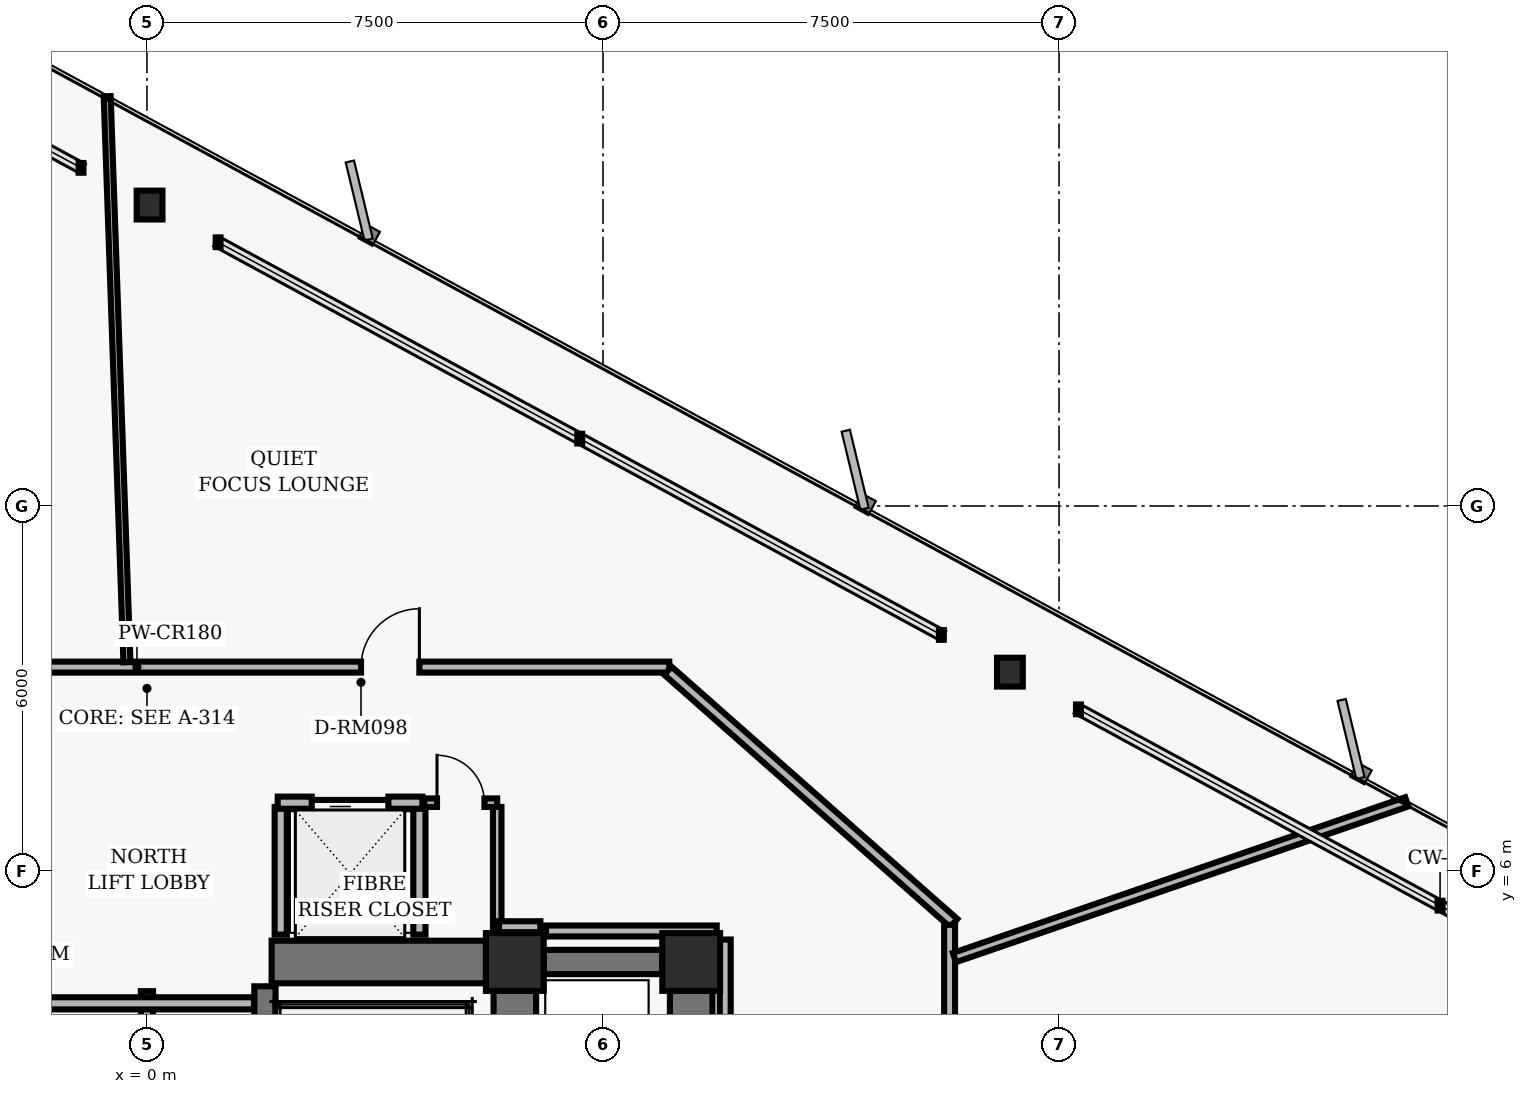
"""IFC4 building model, lengths in metres.
Left out: names, types, materials, properties, quantities, classifications, styles, units other than length and angle.
Written with IfcOpenShell. Run it as: python <this file> out.ifc"""

import sys

from ifc_helpers import new_model, si_unit, direction, frame, frame_2d, origin, origin_2d, place, context, subcontext, project, spatial, rectangle, hollow_rectangle, i_section, extrude, element, fill, save


model = new_model("IFC4")
c1 = context("Model", 3, precision=1e-05, world=origin(), true_north=direction((0.0, 1.0)))
c2 = subcontext(c1, "Body", "Model", "MODEL_VIEW")
j1 = project(units=[si_unit("LENGTHUNIT", "METRE"), si_unit("PLANEANGLEUNIT", "RADIAN")], contexts=[c1])
p1 = place(None, origin())
s1 = spatial("IfcSite", under=j1, at=p1, CompositionType="ELEMENT")
p2 = place(p1, origin())
s2 = spatial("IfcBuilding", under=s1, at=p2, CompositionType="ELEMENT")
p3 = place(p2, frame((0.0, 0.0, 39.04)))
s3 = spatial("IfcBuildingStorey", under=s2, at=p3, CompositionType="ELEMENT", Elevation=39.04)
for number, where, z_axis, x_axis in (
    (1, (6.05, 4.5, 0.0), (0.0, 0.0, 1.0), (1.0, 0.0, 0.0)),
    (2, (8.95, 4.5, 0.0), (0.0, 0.0, 1.0), (1.0, 0.0, 0.0)),
):
    element("IfcColumn", number, at=place(p3, frame(where, z_axis=z_axis, x_axis=x_axis)), inside=s3, PredefinedType="COLUMN", context=c2, shape_type="SweptSolid", body=[
        extrude(hollow_rectangle(XDim=0.95, YDim=0.95, WallThickness=0.06, InnerFilletRadius=0.02, OuterFilletRadius=0.04, at=origin_2d()), origin(), (0.0, 0.0, 1.0), 3.36),
    ])
p4 = place(p3, frame((6.05, 0.475, 0.0), z_axis=(0.0, 0.0, 1.0), x_axis=(0.0, 1.0, 0.0)))
e3 = element("IfcWall", 3, at=p4, inside=s3, PredefinedType="SHEAR", context=c2, shape_type="SweptSolid", body=[
    extrude(rectangle(XDim=3.55, YDim=0.7, at=frame_2d((1.775, 0.0))), origin(), (0.0, 0.0, 1.0), 3.098),
])
p5 = place(p3, frame((1.94, -4.1, 0.0), z_axis=(0.0, 0.0, 1.0), x_axis=(0.0, 1.0, 0.0)))
e4 = element("IfcWall", 4, at=p5, inside=s3, PredefinedType="SHEAR", context=c2, shape_type="SweptSolid", body=[
    extrude(rectangle(XDim=8.2, YDim=0.35, at=frame_2d((4.1, 0.0))), origin(), (0.0, 0.0, 1.0), 3.098),
])
p6 = place(p3, frame((2.05, 4.5, 0.0), z_axis=(0.0, 0.0, 1.0), x_axis=(1.0, 0.0, 0.0)))
e5 = element("IfcWall", 5, at=p6, inside=s3, PredefinedType="SHEAR", context=c2, shape_type="SweptSolid", body=[
    extrude(rectangle(XDim=3.525, YDim=0.7, at=frame_2d((1.762, 0.0))), origin(), (0.0, 0.0, 1.0), 3.098),
])
p7 = place(p3, frame((8.95, -3.825, 0.0), z_axis=(0.0, 0.0, 1.0), x_axis=(0.0, 1.0, 0.0)))
e6 = element("IfcWall", 6, at=p7, inside=s3, PredefinedType="SHEAR", context=c2, shape_type="SweptSolid", body=[
    extrude(rectangle(XDim=7.85, YDim=0.7, at=frame_2d((3.925, 0.0))), origin(), (0.0, 0.0, 1.0), 3.098),
])
p8 = place(p3, frame((6.525, 4.5, 0.0), z_axis=(0.0, 0.0, 1.0), x_axis=(1.0, 0.0, 0.0)))
e7 = element("IfcWall", 7, at=p8, inside=s3, PredefinedType="SHEAR", context=c2, shape_type="SweptSolid", body=[
    extrude(rectangle(XDim=1.95, YDim=0.4, at=frame_2d((0.975, 0.0))), origin(), (0.0, 0.0, 1.0), 3.098),
])
for number, where, z_axis, x_axis in (
    (8, (14.192, 9.267, 0.0), (0.0, 0.0, 1.0), (1.0, 0.0, 0.0)),
    (9, (0.043, 16.949, 0.0), (0.0, 0.0, 1.0), (1.0, 0.0, 0.0)),
):
    element("IfcColumn", number, at=place(p3, frame(where, z_axis=z_axis, x_axis=x_axis)), inside=s3, PredefinedType="COLUMN", context=c2, shape_type="SweptSolid", body=[
        extrude(i_section(OverallWidth=0.424, OverallDepth=0.474, WebThickness=0.048, FlangeThickness=0.077, FilletRadius=0.025, at=origin_2d()), origin(), (0.0, 0.0, 1.0), 3.36),
    ])
p9 = place(p3, frame((0.0, 1.25, 0.0), z_axis=(0.0, 0.0, 1.0), x_axis=(0.0, 1.0, 0.0)))
e10 = element("IfcWall", 10, at=p9, inside=s3, PredefinedType="PARTITIONING", context=c2, shape_type="SweptSolid", body=[
    extrude(rectangle(XDim=2.77, YDim=0.2, at=frame_2d((1.385, 0.0))), origin(), (0.0, 0.0, 1.0), 3.073),
])
p10 = place(p3, frame((-1.76, 3.82, 0.0), z_axis=(0.0, 0.0, 1.0), x_axis=(1.0, 0.0, 0.0)))
e11 = element("IfcWall", 11, at=p10, inside=s3, PredefinedType="PARTITIONING", context=c2, shape_type="SweptSolid", body=[
    extrude(rectangle(XDim=3.52, YDim=0.2, at=frame_2d((1.76, 0.0))), origin(), (0.0, 0.0, 1.0), 3.073),
])
for number, where, z_axis, x_axis in (
    (12, (2.2, 4.95, 0.0), (0.0, 0.0, 1.0), (0.0, 1.0, 0.0)),
    (13, (4.48, 4.95, 0.0), (0.0, 0.0, 1.0), (0.0, 1.0, 0.0)),
):
    element("IfcWall", number, at=place(p3, frame(where, z_axis=z_axis, x_axis=x_axis)), inside=s3, PredefinedType="PARTITIONING", context=c2, shape_type="SweptSolid", body=[
        extrude(rectangle(XDim=2.1, YDim=0.2, at=frame_2d((1.05, 0.0))), origin(), (0.0, 0.0, 1.0), 3.073),
    ])
p11 = place(p3, frame((2.15, 7.12, 0.0), z_axis=(0.0, 0.0, 1.0), x_axis=(1.0, 0.0, 0.0)))
e14 = element("IfcWall", 14, at=p11, inside=s3, PredefinedType="PARTITIONING", context=c2, shape_type="SweptSolid", body=[
    extrude(rectangle(XDim=2.38, YDim=0.2, at=frame_2d((1.19, 0.0))), origin(), (0.0, 0.0, 1.0), 3.073),
])
p12 = place(p11, frame((0.56, 0.0, 0.0)))
e15 = element("IfcOpeningElement", 15, at=p12, cuts=e14, PredefinedType="OPENING", context=c2, shape_type="SweptSolid", body=[
    extrude(rectangle(XDim=1.26, YDim=2.06, at=frame_2d((0.63, 1.03))), frame((0.0, 0.11, 0.0), z_axis=(0.0, -1.0, 0.0), x_axis=(1.0, 0.0, 0.0)), (0.0, 0.0, 1.0), 0.22),
])
p13 = place(p3, frame((5.76, 4.95, 0.0), z_axis=(0.0, 0.0, 1.0), x_axis=(0.0, 1.0, 0.0)))
e16 = element("IfcWall", 16, at=p13, inside=s3, PredefinedType="PARTITIONING", context=c2, shape_type="SweptSolid", body=[
    extrude(rectangle(XDim=2.1, YDim=0.14, at=frame_2d((1.05, 0.0))), origin(), (0.0, 0.0, 1.0), 3.073),
])
p14 = place(p3, frame((4.56, 7.12, 0.0), z_axis=(0.0, 0.0, 1.0), x_axis=(1.0, 0.0, 0.0)))
e17 = element("IfcWall", 17, at=p14, inside=s3, PredefinedType="PARTITIONING", context=c2, shape_type="SweptSolid", body=[
    extrude(rectangle(XDim=1.2, YDim=0.14, at=frame_2d((0.6, 0.0))), origin(), (0.0, 0.0, 1.0), 3.073),
])
p15 = place(p14, frame((0.21, 0.0, 0.0)))
e18 = element("IfcOpeningElement", 18, at=p15, cuts=e17, PredefinedType="OPENING", context=c2, shape_type="SweptSolid", body=[
    extrude(rectangle(XDim=0.78, YDim=2.01, at=frame_2d((0.39, 1.005))), frame((0.0, 0.08, 0.0), z_axis=(0.0, -1.0, 0.0), x_axis=(1.0, 0.0, 0.0)), (0.0, 0.0, 1.0), 0.16),
])
p16 = place(p3, frame((-8.59, 9.35, 0.0), z_axis=(0.0, 0.0, 1.0), x_axis=(1.0, 0.0, 0.0)))
e19 = element("IfcWall", 19, at=p16, inside=s3, PredefinedType="PARTITIONING", context=c2, shape_type="SweptSolid", body=[
    extrude(rectangle(XDim=17.18, YDim=0.18, at=frame_2d((8.59, 0.0))), origin(), (0.0, 0.0, 1.0), 2.587),
])
p17 = place(p16, frame((12.11, 0.0, 0.0)))
e20 = element("IfcOpeningElement", 20, at=p17, cuts=e19, PredefinedType="OPENING", context=c2, shape_type="SweptSolid", body=[
    extrude(rectangle(XDim=0.96, YDim=2.02, at=frame_2d((0.48, 1.01))), frame((0.0, 0.1, 0.0), z_axis=(0.0, -1.0, 0.0), x_axis=(1.0, 0.0, 0.0)), (0.0, 0.0, 1.0), 0.2),
])
p18 = place(p16, frame((3.781, 0.0, 0.0)))
e21 = element("IfcOpeningElement", 21, at=p18, cuts=e19, PredefinedType="OPENING", context=c2, shape_type="SweptSolid", body=[
    extrude(rectangle(XDim=0.96, YDim=2.02, at=frame_2d((0.48, 1.01))), frame((0.0, 0.1, 0.0), z_axis=(0.0, -1.0, 0.0), x_axis=(1.0, 0.0, 0.0)), (0.0, 0.0, 1.0), 0.2),
])
p19 = place(p3, frame((8.567, 9.29, 0.0), z_axis=(0.0, 0.0, 1.0), x_axis=(0.749626463267, -0.66186113768, 0.0)))
e22 = element("IfcWall", 22, at=p19, inside=s3, PredefinedType="PARTITIONING", context=c2, shape_type="SweptSolid", body=[
    extrude(rectangle(XDim=6.27, YDim=0.18, at=frame_2d((3.135, 0.0))), origin(), (0.0, 0.0, 1.0), 2.587),
])
p20 = place(p3, frame((13.2, 5.11, 0.0), z_axis=(0.0, 0.0, 1.0), x_axis=(0.0, -1.0, 0.0)))
e23 = element("IfcWall", 23, at=p20, inside=s3, PredefinedType="PARTITIONING", context=c2, shape_type="SweptSolid", body=[
    extrude(rectangle(XDim=10.22, YDim=0.18, at=frame_2d((5.11, 0.0))), origin(), (0.0, 0.0, 1.0), 3.073),
])
p21 = place(p20, frame((4.6, 0.0, 0.0)))
e24 = element("IfcOpeningElement", 24, at=p21, cuts=e23, PredefinedType="OPENING", context=c2, shape_type="SweptSolid", body=[
    extrude(rectangle(XDim=1.02, YDim=2.02, at=frame_2d((0.51, 1.01))), frame((0.0, 0.1, 0.0), z_axis=(0.0, -1.0, 0.0), x_axis=(1.0, 0.0, 0.0)), (0.0, 0.0, 1.0), 0.2),
])
p22 = place(p3, frame((9.51, -4.87, 0.0), z_axis=(0.0, 0.0, 1.0), x_axis=(0.0, 1.0, 0.0)))
e25 = element("IfcWall", 25, at=p22, inside=s3, PredefinedType="PARTITIONING", context=c2, shape_type="SweptSolid", body=[
    extrude(rectangle(XDim=9.74, YDim=0.18, at=frame_2d((4.87, 0.0))), origin(), (0.0, 0.0, 1.0), 3.073),
])
p23 = place(p3, frame((9.37, 5.01, 0.0), z_axis=(0.0, 0.0, 1.0), x_axis=(-1.0, 0.0, 0.0)))
e26 = element("IfcWall", 26, at=p23, inside=s3, PredefinedType="PARTITIONING", context=c2, shape_type="SweptSolid", body=[
    extrude(rectangle(XDim=2.808, YDim=0.18, at=frame_2d((1.404, 0.0))), origin(), (0.0, 0.0, 1.0), 3.073),
])
p24 = place(p3, frame((6.47, 5.08, 0.0), z_axis=(0.0, 0.0, 1.0), x_axis=(-1.0, 0.0, 0.0)))
e27 = element("IfcWall", 27, at=p24, inside=s3, PredefinedType="PARTITIONING", context=c2, shape_type="SweptSolid", body=[
    extrude(rectangle(XDim=0.68, YDim=0.18, at=frame_2d((0.34, 0.0))), origin(), (0.0, 0.0, 1.0), 3.073),
])
p25 = place(p3, frame((13.28, 4.573, 0.0), z_axis=(0.0, 0.0, 1.0), x_axis=(0.94552490271, 0.325549778613, 0.0)))
e28 = element("IfcWall", 28, at=p25, inside=s3, PredefinedType="PARTITIONING", context=c2, shape_type="SweptSolid", body=[
    extrude(rectangle(XDim=7.867, YDim=0.16, at=frame_2d((3.934, 0.0))), origin(), (0.0, 0.0, 1.0), 3.073),
])
p26 = place(p3, frame((-0.329, 9.43, 0.0), z_axis=(0.0, 0.0, 1.0), x_axis=(-0.034885649993, 0.999391310461, 0.0)))
e29 = element("IfcWall", 29, at=p26, inside=s3, PredefinedType="MOVABLE", context=c2, shape_type="SweptSolid", body=[
    extrude(rectangle(XDim=9.315, YDim=0.115, at=frame_2d((4.657, 0.0))), origin(), (0.0, 0.0, 1.0), 3.073),
])
p27 = place(p12, origin())
e30 = element("IfcDoor", 30, at=p27, inside=s3, OperationType="SLIDING_TO_LEFT", PredefinedType="DOOR", context=c2, shape_type="SweptSolid", body=[
    extrude(rectangle(XDim=1.26, YDim=2.06, at=frame_2d((0.63, 1.03))), frame((0.0, 0.025, 0.0), z_axis=(0.0, -1.0, 0.0), x_axis=(1.0, 0.0, 0.0)), (0.0, 0.0, 1.0), 0.05),
])
fill(e15, e30)
p28 = place(p15, origin())
e31 = element("IfcDoor", 31, at=p28, inside=s3, OperationType="SINGLE_SWING_LEFT", PredefinedType="DOOR", context=c2, shape_type="SweptSolid", body=[
    extrude(rectangle(XDim=0.78, YDim=2.01, at=frame_2d((0.39, 1.005))), frame((0.0, 0.025, 0.0), z_axis=(0.0, -1.0, 0.0), x_axis=(1.0, 0.0, 0.0)), (0.0, 0.0, 1.0), 0.05),
])
fill(e18, e31)
p29 = place(p17, origin())
e32 = element("IfcDoor", 32, at=p29, inside=s3, OperationType="SINGLE_SWING_RIGHT", PredefinedType="DOOR", context=c2, shape_type="SweptSolid", body=[
    extrude(rectangle(XDim=0.96, YDim=2.02, at=frame_2d((0.48, 1.01))), frame((0.0, 0.025, 0.0), z_axis=(0.0, -1.0, 0.0), x_axis=(1.0, 0.0, 0.0)), (0.0, 0.0, 1.0), 0.05),
])
fill(e20, e32)
save(model, sys.argv[1])
